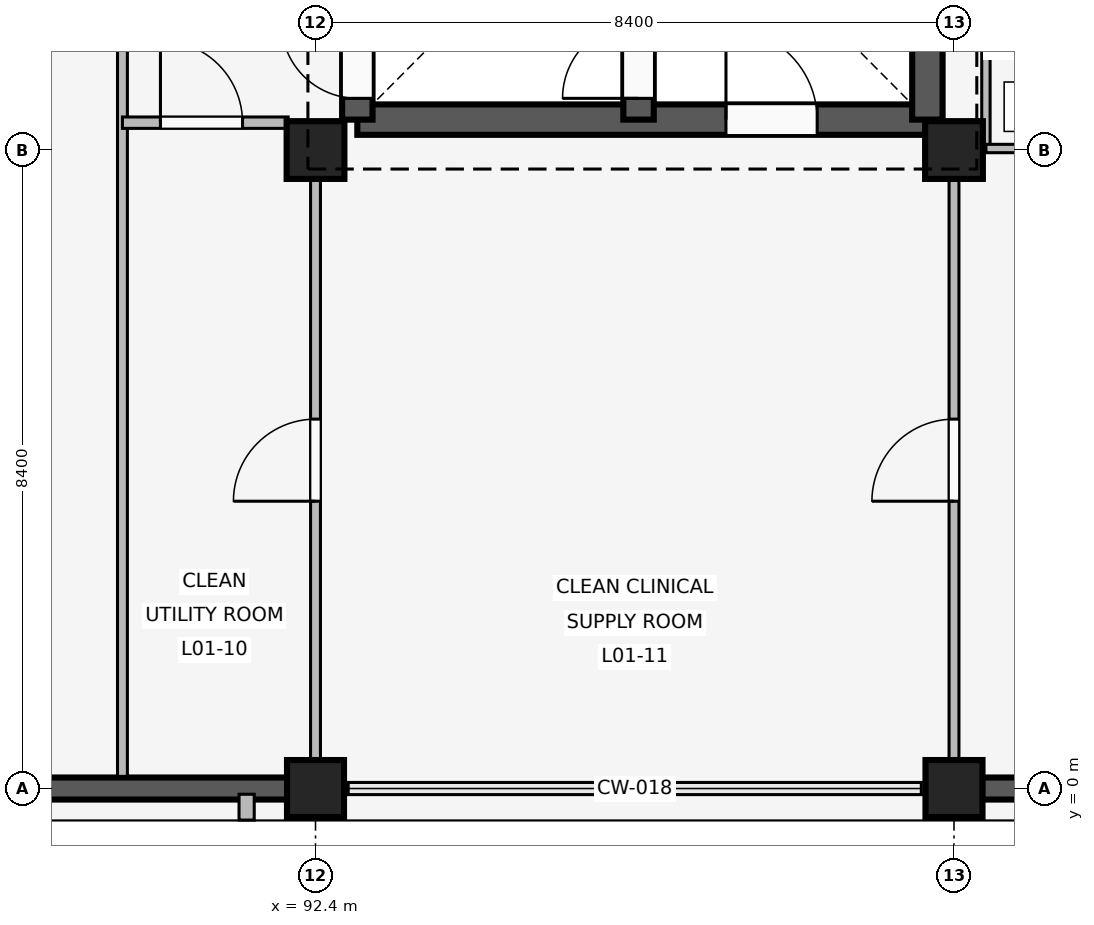
"""IFC4 building model, lengths in metres.
Left out: names, types, materials, properties, quantities, classifications, styles, units other than length and angle.
Written with IfcOpenShell. Run it as: python <this file> out.ifc"""

import sys

from ifc_helpers import new_model, si_unit, direction, frame, frame_2d, origin, origin_2d, place, context, subcontext, project, spatial, rectangle, extrude, element, fill, save


model = new_model("IFC4")
c1 = context("Model", 3, precision=1e-05, world=origin(), true_north=direction((0.0, 1.0)))
c2 = subcontext(c1, "Body", "Model", "MODEL_VIEW")
j1 = project(units=[si_unit("LENGTHUNIT", "METRE"), si_unit("PLANEANGLEUNIT", "RADIAN")], contexts=[c1])
p1 = place(None, origin())
s1 = spatial("IfcSite", under=j1, at=p1, CompositionType="ELEMENT")
p2 = place(p1, origin())
s2 = spatial("IfcBuilding", under=s1, at=p2, CompositionType="ELEMENT")
p3 = place(p2, frame((0.0, 0.0, 4.8)))
s3 = spatial("IfcBuildingStorey", under=s2, at=p3, CompositionType="ELEMENT", Elevation=4.8)
p4 = place(p3, frame((92.4, 0.0, 0.0), z_axis=(0.0, 0.0, 1.0), x_axis=(1.0, 0.0, 0.0)))
e1 = element("IfcColumn", 1, at=p4, inside=s3, PredefinedType="COLUMN", context=c2, shape_type="SweptSolid", body=[
    extrude(rectangle(XDim=0.75, YDim=0.75, at=origin_2d()), origin(), (0.0, 0.0, 1.0), 3.3),
])
p5 = place(p3, frame((92.4, 8.4, 0.0), z_axis=(0.0, 0.0, 1.0), x_axis=(1.0, 0.0, 0.0)))
e2 = element("IfcColumn", 2, at=p5, inside=s3, PredefinedType="COLUMN", context=c2, shape_type="SweptSolid", body=[
    extrude(rectangle(XDim=0.76, YDim=0.76, at=origin_2d()), origin(), (0.0, 0.0, 1.0), 3.3),
])
p6 = place(p3, frame((100.8, 0.0, 0.0), z_axis=(0.0, 0.0, 1.0), x_axis=(1.0, 0.0, 0.0)))
e3 = element("IfcColumn", 3, at=p6, inside=s3, PredefinedType="COLUMN", context=c2, shape_type="SweptSolid", body=[
    extrude(rectangle(XDim=0.75, YDim=0.75, at=origin_2d()), origin(), (0.0, 0.0, 1.0), 3.3),
])
p7 = place(p3, frame((100.8, 8.4, 0.0), z_axis=(0.0, 0.0, 1.0), x_axis=(1.0, 0.0, 0.0)))
e4 = element("IfcColumn", 4, at=p7, inside=s3, PredefinedType="COLUMN", context=c2, shape_type="SweptSolid", body=[
    extrude(rectangle(XDim=0.76, YDim=0.76, at=origin_2d()), origin(), (0.0, 0.0, 1.0), 3.3),
])
p8 = place(p3, frame((92.03, 0.0, 0.0), z_axis=(0.0, 0.0, 1.0), x_axis=(-1.0, 0.0, 0.0)))
e5 = element("IfcWall", 5, at=p8, inside=s3, PredefinedType="SOLIDWALL", context=c2, shape_type="SweptSolid", body=[
    extrude(rectangle(XDim=7.66, YDim=0.29, at=frame_2d((3.83, 0.0))), origin(), (0.0, 0.0, 1.0), 2.42),
])
p9 = place(p8, frame((5.088, 0.0, 0.85)))
e6 = element("IfcOpeningElement", 6, at=p9, cuts=e5, PredefinedType="OPENING", context=c2, shape_type="SweptSolid", body=[
    extrude(rectangle(XDim=1.62, YDim=0.95, at=frame_2d((0.81, 0.475))), frame((0.0, 0.155, 0.0), z_axis=(0.0, -1.0, 0.0), x_axis=(1.0, 0.0, 0.0)), (0.0, 0.0, 1.0), 0.31),
])
p10 = place(p3, frame((91.494, -0.075, 0.0), z_axis=(0.0, 0.0, 1.0), x_axis=(0.0, -1.0, 0.0)))
e7 = element("IfcWall", 7, at=p10, inside=s3, PredefinedType="ELEMENTEDWALL", context=c2, shape_type="SweptSolid", body=[
    extrude(rectangle(XDim=0.34, YDim=0.2, at=frame_2d((0.17, 0.0))), origin(), (0.0, 0.0, 1.0), 2.4),
])
p11 = place(p3, frame((108.83, 0.0, 0.0), z_axis=(0.0, 0.0, 1.0), x_axis=(-1.0, 0.0, 0.0)))
e8 = element("IfcWall", 8, at=p11, inside=s3, PredefinedType="SOLIDWALL", context=c2, shape_type="SweptSolid", body=[
    extrude(rectangle(XDim=7.66, YDim=0.29, at=frame_2d((3.83, 0.0))), origin(), (0.0, 0.0, 1.0), 2.42),
])
p12 = place(p11, frame((0.952, 0.0, 0.85)))
e9 = element("IfcOpeningElement", 9, at=p12, cuts=e8, PredefinedType="OPENING", context=c2, shape_type="SweptSolid", body=[
    extrude(rectangle(XDim=1.62, YDim=0.95, at=frame_2d((0.81, 0.475))), frame((0.0, 0.155, 0.0), z_axis=(0.0, -1.0, 0.0), x_axis=(1.0, 0.0, 0.0)), (0.0, 0.0, 1.0), 0.31),
])
p13 = place(p11, frame((5.088, 0.0, 0.85)))
e10 = element("IfcOpeningElement", 10, at=p13, cuts=e8, PredefinedType="OPENING", context=c2, shape_type="SweptSolid", body=[
    extrude(rectangle(XDim=1.62, YDim=0.95, at=frame_2d((0.81, 0.475))), frame((0.0, 0.155, 0.0), z_axis=(0.0, -1.0, 0.0), x_axis=(1.0, 0.0, 0.0)), (0.0, 0.0, 1.0), 0.31),
])
p14 = place(p3, frame((92.95, 8.8, 0.0), z_axis=(0.0, 0.0, 1.0), x_axis=(1.0, 0.0, 0.0)))
e11 = element("IfcWall", 11, at=p14, inside=s3, PredefinedType="SHEAR", context=c2, shape_type="SweptSolid", body=[
    extrude(rectangle(XDim=7.5, YDim=0.4, at=frame_2d((3.75, 0.0))), origin(), (0.0, 0.0, 1.0), 3.02),
])
p15 = place(p14, frame((4.85, 0.0, 0.0)))
e12 = element("IfcOpeningElement", 12, at=p15, cuts=e11, PredefinedType="OPENING", context=c2, shape_type="SweptSolid", body=[
    extrude(rectangle(XDim=1.2, YDim=2.1, at=frame_2d((0.6, 1.05))), frame((0.0, 0.21, 0.0), z_axis=(0.0, -1.0, 0.0), x_axis=(1.0, 0.0, 0.0)), (0.0, 0.0, 1.0), 0.42),
])
p16 = place(p3, frame((92.95, 8.8, 0.0), z_axis=(0.0, 0.0, 1.0), x_axis=(0.0, 1.0, 0.0)))
e13 = element("IfcWall", 13, at=p16, inside=s3, PredefinedType="SHEAR", context=c2, shape_type="SweptSolid", body=[
    extrude(rectangle(XDim=7.55, YDim=0.4, at=frame_2d((3.775, 0.0))), origin(), (0.0, 0.0, 1.0), 3.02),
])
p17 = place(p16, frame((0.28, 0.0, 0.0)))
e14 = element("IfcOpeningElement", 14, at=p17, cuts=e13, PredefinedType="OPENING", context=c2, shape_type="SweptSolid", body=[
    extrude(rectangle(XDim=1.0, YDim=2.15, at=frame_2d((0.5, 1.075))), frame((0.0, 0.21, 0.0), z_axis=(0.0, -1.0, 0.0), x_axis=(1.0, 0.0, 0.0)), (0.0, 0.0, 1.0), 0.42),
])
p18 = place(p3, frame((100.45, 8.8, 0.0), z_axis=(0.0, 0.0, 1.0), x_axis=(0.0, 1.0, 0.0)))
e15 = element("IfcWall", 15, at=p18, inside=s3, PredefinedType="SHEAR", context=c2, shape_type="SweptSolid", body=[
    extrude(rectangle(XDim=7.55, YDim=0.4, at=frame_2d((3.775, 0.0))), origin(), (0.0, 0.0, 1.0), 3.02),
])
p19 = place(p18, frame((2.4, 0.0, 0.0)))
e16 = element("IfcOpeningElement", 16, at=p19, cuts=e15, PredefinedType="OPENING", context=c2, shape_type="SweptSolid", body=[
    extrude(rectangle(XDim=1.2, YDim=2.2, at=frame_2d((0.6, 1.1))), frame((0.0, 0.21, 0.0), z_axis=(0.0, -1.0, 0.0), x_axis=(1.0, 0.0, 0.0)), (0.0, 0.0, 1.0), 0.42),
])
p20 = place(p3, frame((96.65, 8.8, 0.0), z_axis=(0.0, 0.0, 1.0), x_axis=(0.0, 1.0, 0.0)))
e17 = element("IfcWall", 17, at=p20, inside=s3, PredefinedType="SHEAR", context=c2, shape_type="SweptSolid", body=[
    extrude(rectangle(XDim=7.55, YDim=0.4, at=frame_2d((3.775, 0.0))), origin(), (0.0, 0.0, 1.0), 3.02),
])
p21 = place(p20, frame((0.28, 0.0, 0.0)))
e18 = element("IfcOpeningElement", 18, at=p21, cuts=e17, PredefinedType="OPENING", context=c2, shape_type="SweptSolid", body=[
    extrude(rectangle(XDim=1.0, YDim=2.15, at=frame_2d((0.5, 1.075))), frame((0.0, 0.21, 0.0), z_axis=(0.0, -1.0, 0.0), x_axis=(1.0, 0.0, 0.0)), (0.0, 0.0, 1.0), 0.42),
])
p22 = place(p3, frame((89.86, 0.16, 0.0), z_axis=(0.0, 0.0, 1.0), x_axis=(0.0, 1.0, 0.0)))
e19 = element("IfcWall", 19, at=p22, inside=s3, PredefinedType="PARTITIONING", context=c2, shape_type="SweptSolid", body=[
    extrude(rectangle(XDim=10.94, YDim=0.13, at=frame_2d((5.47, 0.0))), origin(), (0.0, 0.0, 1.0), 2.4),
])
p23 = place(p3, frame((89.86, 8.76, 0.0), z_axis=(0.0, 0.0, 1.0), x_axis=(1.0, 0.0, 0.0)))
e20 = element("IfcWall", 20, at=p23, inside=s3, PredefinedType="PARTITIONING", context=c2, shape_type="SweptSolid", body=[
    extrude(rectangle(XDim=2.18, YDim=0.15, at=frame_2d((1.09, 0.0))), origin(), (0.0, 0.0, 1.0), 2.4),
])
p24 = place(p23, frame((0.5, 0.0, 0.0)))
e21 = element("IfcOpeningElement", 21, at=p24, cuts=e20, PredefinedType="OPENING", context=c2, shape_type="SweptSolid", body=[
    extrude(rectangle(XDim=1.08, YDim=2.15, at=frame_2d((0.54, 1.075))), frame((0.0, 0.085, 0.0), z_axis=(0.0, -1.0, 0.0), x_axis=(1.0, 0.0, 0.0)), (0.0, 0.0, 1.0), 0.17),
])
p25 = place(p3, frame((92.4, 0.14, 0.0), z_axis=(0.0, 0.0, 1.0), x_axis=(0.0, 1.0, 0.0)))
e22 = element("IfcWall", 22, at=p25, inside=s3, PredefinedType="PARTITIONING", context=c2, shape_type="SweptSolid", body=[
    extrude(rectangle(XDim=8.21, YDim=0.13, at=frame_2d((4.105, 0.0))), origin(), (0.0, 0.0, 1.0), 2.4),
])
p26 = place(p25, frame((3.64, 0.0, 0.0)))
e23 = element("IfcOpeningElement", 23, at=p26, cuts=e22, PredefinedType="OPENING", context=c2, shape_type="SweptSolid", body=[
    extrude(rectangle(XDim=1.08, YDim=2.15, at=frame_2d((0.54, 1.075))), frame((0.0, 0.075, 0.0), z_axis=(0.0, -1.0, 0.0), x_axis=(1.0, 0.0, 0.0)), (0.0, 0.0, 1.0), 0.15),
])
p27 = place(p3, frame((100.8, 0.14, 0.0), z_axis=(0.0, 0.0, 1.0), x_axis=(0.0, 1.0, 0.0)))
e24 = element("IfcWall", 24, at=p27, inside=s3, PredefinedType="PARTITIONING", context=c2, shape_type="SweptSolid", body=[
    extrude(rectangle(XDim=8.21, YDim=0.13, at=frame_2d((4.105, 0.0))), origin(), (0.0, 0.0, 1.0), 2.4),
])
p28 = place(p27, frame((3.64, 0.0, 0.0)))
e25 = element("IfcOpeningElement", 25, at=p28, cuts=e24, PredefinedType="OPENING", context=c2, shape_type="SweptSolid", body=[
    extrude(rectangle(XDim=1.08, YDim=2.15, at=frame_2d((0.54, 1.075))), frame((0.0, 0.075, 0.0), z_axis=(0.0, -1.0, 0.0), x_axis=(1.0, 0.0, 0.0)), (0.0, 0.0, 1.0), 0.15),
])
p29 = place(p3, frame((101.22, 8.42, 0.0), z_axis=(0.0, 0.0, 1.0), x_axis=(0.0, 1.0, 0.0)))
e26 = element("IfcWall", 26, at=p29, inside=s3, PredefinedType="PARTITIONING", context=c2, shape_type="SweptSolid", body=[
    extrude(rectangle(XDim=2.61, YDim=0.11, at=frame_2d((1.305, 0.0))), origin(), (0.0, 0.0, 1.0), 2.4),
])
p30 = place(p3, frame((101.22, 8.42, 0.0), z_axis=(0.0, 0.0, 1.0), x_axis=(1.0, 0.0, 0.0)))
e27 = element("IfcWall", 27, at=p30, inside=s3, PredefinedType="PARTITIONING", context=c2, shape_type="SweptSolid", body=[
    extrude(rectangle(XDim=1.98, YDim=0.11, at=frame_2d((0.99, 0.0))), origin(), (0.0, 0.0, 1.0), 2.4),
])
p31 = place(p30, frame((0.54, 0.0, 0.0)))
e28 = element("IfcOpeningElement", 28, at=p31, cuts=e27, PredefinedType="OPENING", context=c2, shape_type="SweptSolid", body=[
    extrude(rectangle(XDim=0.9, YDim=2.1, at=frame_2d((0.45, 1.05))), frame((0.0, 0.065, 0.0), z_axis=(0.0, -1.0, 0.0), x_axis=(1.0, 0.0, 0.0)), (0.0, 0.0, 1.0), 0.13),
])
p32 = place(p15, origin())
e29 = element("IfcDoor", 29, at=p32, inside=s3, OperationType="SINGLE_SWING_LEFT", PredefinedType="DOOR", context=c2, shape_type="SweptSolid", body=[
    extrude(rectangle(XDim=1.2, YDim=2.1, at=frame_2d((0.6, 1.05))), frame((0.0, 0.025, 0.0), z_axis=(0.0, -1.0, 0.0), x_axis=(1.0, 0.0, 0.0)), (0.0, 0.0, 1.0), 0.05),
])
fill(e12, e29)
p33 = place(p17, origin())
e30 = element("IfcDoor", 30, at=p33, inside=s3, OperationType="SINGLE_SWING_RIGHT", PredefinedType="DOOR", context=c2, shape_type="SweptSolid", body=[
    extrude(rectangle(XDim=1.0, YDim=2.15, at=frame_2d((0.5, 1.075))), frame((0.0, 0.025, 0.0), z_axis=(0.0, -1.0, 0.0), x_axis=(1.0, 0.0, 0.0)), (0.0, 0.0, 1.0), 0.05),
])
fill(e14, e30)
p34 = place(p21, origin())
e31 = element("IfcDoor", 31, at=p34, inside=s3, OperationType="SINGLE_SWING_LEFT", PredefinedType="DOOR", context=c2, shape_type="SweptSolid", body=[
    extrude(rectangle(XDim=1.0, YDim=2.15, at=frame_2d((0.5, 1.075))), frame((0.0, 0.025, 0.0), z_axis=(0.0, -1.0, 0.0), x_axis=(1.0, 0.0, 0.0)), (0.0, 0.0, 1.0), 0.05),
])
fill(e18, e31)
p35 = place(p24, origin())
e32 = element("IfcDoor", 32, at=p35, inside=s3, OperationType="SINGLE_SWING_LEFT", PredefinedType="DOOR", context=c2, shape_type="SweptSolid", body=[
    extrude(rectangle(XDim=1.08, YDim=2.15, at=frame_2d((0.54, 1.075))), frame((0.0, 0.025, 0.0), z_axis=(0.0, -1.0, 0.0), x_axis=(1.0, 0.0, 0.0)), (0.0, 0.0, 1.0), 0.05),
])
fill(e21, e32)
p36 = place(p26, origin())
e33 = element("IfcDoor", 33, at=p36, inside=s3, OperationType="SINGLE_SWING_LEFT", PredefinedType="DOOR", context=c2, shape_type="SweptSolid", body=[
    extrude(rectangle(XDim=1.08, YDim=2.15, at=frame_2d((0.54, 1.075))), frame((0.0, 0.025, 0.0), z_axis=(0.0, -1.0, 0.0), x_axis=(1.0, 0.0, 0.0)), (0.0, 0.0, 1.0), 0.05),
])
fill(e23, e33)
p37 = place(p28, origin())
e34 = element("IfcDoor", 34, at=p37, inside=s3, OperationType="SINGLE_SWING_LEFT", PredefinedType="DOOR", context=c2, shape_type="SweptSolid", body=[
    extrude(rectangle(XDim=1.08, YDim=2.15, at=frame_2d((0.54, 1.075))), frame((0.0, 0.025, 0.0), z_axis=(0.0, -1.0, 0.0), x_axis=(1.0, 0.0, 0.0)), (0.0, 0.0, 1.0), 0.05),
])
fill(e25, e34)
save(model, sys.argv[1])
